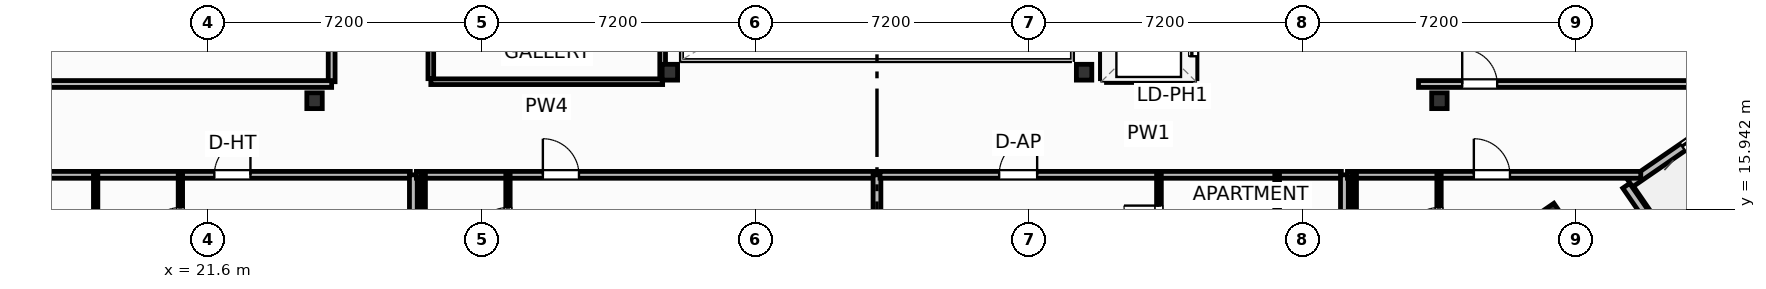
"""IFC4 building model, lengths in metres.
Left out: names, types, materials, properties, quantities, classifications, styles, units other than length and angle.
Written with IfcOpenShell. Run it as: python <this file> out.ifc"""

import sys

from ifc_helpers import new_model, si_unit, direction, frame, frame_2d, origin, origin_2d, place, context, subcontext, project, spatial, rectangle, i_section, extrude, element, fill, save


model = new_model("IFC4")
c1 = context("Model", 3, precision=1e-05, world=origin(), true_north=direction((0.0, 1.0)))
c2 = subcontext(c1, "Body", "Model", "MODEL_VIEW")
j1 = project(units=[si_unit("LENGTHUNIT", "METRE"), si_unit("PLANEANGLEUNIT", "RADIAN")], contexts=[c1])
p1 = place(None, origin())
s1 = spatial("IfcSite", under=j1, at=p1, CompositionType="ELEMENT")
p2 = place(p1, origin())
s2 = spatial("IfcBuilding", under=s1, at=p2, CompositionType="ELEMENT")
p3 = place(p2, frame((0.0, 0.0, 269.3)))
s3 = spatial("IfcBuildingStorey", under=s2, at=p3, CompositionType="ELEMENT", Elevation=269.3)
for number, where, z_axis, x_axis in (
    (1, (33.75, 19.55, 0.0), (0.0, 0.0, 1.0), (1.0, 0.0, 0.0)),
    (2, (44.65, 19.55, 0.0), (0.0, 0.0, 1.0), (1.0, 0.0, 0.0)),
    (3, (24.4, 18.8, 0.0), (0.0, 0.0, 1.0), (1.0, 0.0, 0.0)),
    (4, (54.0, 18.8, 0.0), (0.0, 0.0, 1.0), (1.0, 0.0, 0.0)),
):
    element("IfcColumn", number, at=place(p3, frame(where, z_axis=z_axis, x_axis=x_axis)), inside=s3, PredefinedType="COLUMN", context=c2, shape_type="SweptSolid", body=[
        extrude(i_section(OverallWidth=0.406, OverallDepth=0.416, WebThickness=0.03, FlangeThickness=0.048, FilletRadius=0.025, at=origin_2d()), origin(), (0.0, 0.0, 1.0), 3.7),
    ])
p4 = place(p3, frame((56.96, 15.823, 0.0), z_axis=(0.0, 0.0, 1.0), x_axis=(0.823532597628, 0.567268949127, 0.0)))
e5 = element("IfcColumn", 5, at=p4, inside=s3, PredefinedType="COLUMN", context=c2, shape_type="SweptSolid", body=[
    extrude(i_section(OverallWidth=0.401, OverallDepth=0.399, WebThickness=0.025, FlangeThickness=0.04, FilletRadius=0.022, at=origin_2d()), origin(), (0.0, 0.0, 1.0), 3.7),
])
p5 = place(p3, frame((63.605, 19.78, 0.0), z_axis=(0.0, 0.0, 1.0), x_axis=(-0.823541290762, -0.567256328665, 0.0)))
e6 = element("IfcWall", 6, at=p5, inside=s3, PredefinedType="SOLIDWALL", context=c2, shape_type="SweptSolid", body=[
    extrude(rectangle(XDim=5.567, YDim=0.22, at=frame_2d((2.784, 0.0))), origin(), (0.0, 0.0, 1.0), 2.73),
])
p6 = place(p5, frame((1.787, 0.0, 0.0)))
e7 = element("IfcOpeningElement", 7, at=p6, cuts=e6, PredefinedType="OPENING", context=c2, shape_type="SweptSolid", body=[
    extrude(rectangle(XDim=2.1, YDim=2.3, at=frame_2d((1.05, 1.15))), frame((0.0, 0.12, 0.0), z_axis=(0.0, -1.0, 0.0), x_axis=(1.0, 0.0, 0.0)), (0.0, 0.0, 1.0), 0.24),
])
p7 = place(p3, frame((60.036, 14.936, 0.0), z_axis=(0.0, 0.0, 1.0), x_axis=(-0.567273565974, 0.823529417415, 0.0)))
e8 = element("IfcWall", 8, at=p7, inside=s3, PredefinedType="SOLIDWALL", context=c2, shape_type="SweptSolid", body=[
    extrude(rectangle(XDim=1.975, YDim=0.22, at=frame_2d((0.988, 0.0))), origin(), (0.0, 0.0, 1.0), 2.73),
])
p8 = place(p3, frame((5.038, 16.85, 0.0), z_axis=(0.0, 0.0, 1.0), x_axis=(1.0, 0.0, 0.0)))
e9 = element("IfcWall", 9, at=p8, inside=s3, PredefinedType="PARTITIONING", context=c2, shape_type="SweptSolid", body=[
    extrude(rectangle(XDim=21.882, YDim=0.18, at=frame_2d((10.941, 0.0))), origin(), (0.0, 0.0, 1.0), 2.739),
])
p9 = place(p8, frame((16.725, 0.0, 0.0)))
e10 = element("IfcOpeningElement", 10, at=p9, cuts=e9, PredefinedType="OPENING", context=c2, shape_type="SweptSolid", body=[
    extrude(rectangle(XDim=0.95, YDim=2.15, at=frame_2d((0.475, 1.075))), frame((0.0, 0.1, 0.0), z_axis=(0.0, -1.0, 0.0), x_axis=(1.0, 0.0, 0.0)), (0.0, 0.0, 1.0), 0.2),
])
p10 = place(p3, frame((20.87, 14.33, 0.0), z_axis=(0.0, 0.0, 1.0), x_axis=(0.0, 1.0, 0.0)))
e11 = element("IfcWall", 11, at=p10, inside=s3, PredefinedType="PARTITIONING", context=c2, shape_type="SweptSolid", body=[
    extrude(rectangle(XDim=2.52, YDim=0.115, at=frame_2d((1.26, 0.0))), origin(), (0.0, 0.0, 1.0), 3.45),
])
p11 = place(p10, frame((0.76, 0.0, 0.0)))
e12 = element("IfcOpeningElement", 12, at=p11, cuts=e11, PredefinedType="OPENING", context=c2, shape_type="SweptSolid", body=[
    extrude(rectangle(XDim=0.9, YDim=2.05, at=frame_2d((0.45, 1.025))), frame((0.0, 0.067, 0.0), z_axis=(0.0, -1.0, 0.0), x_axis=(1.0, 0.0, 0.0)), (0.0, 0.0, 1.0), 0.135),
])
p12 = place(p3, frame((18.64, 14.33, 0.0), z_axis=(0.0, 0.0, 1.0), x_axis=(0.0, 1.0, 0.0)))
e13 = element("IfcWall", 13, at=p12, inside=s3, PredefinedType="PARTITIONING", context=c2, shape_type="SweptSolid", body=[
    extrude(rectangle(XDim=2.52, YDim=0.115, at=frame_2d((1.26, 0.0))), origin(), (0.0, 0.0, 1.0), 3.45),
])
p13 = place(p3, frame((27.0, -4.0, 0.0), z_axis=(0.0, 0.0, 1.0), x_axis=(0.0, 1.0, 0.0)))
e14 = element("IfcWall", 14, at=p13, inside=s3, PredefinedType="PARTITIONING", context=c2, shape_type="SweptSolid", body=[
    extrude(rectangle(XDim=20.85, YDim=0.205, at=frame_2d((10.425, 0.0))), origin(), (0.0, 0.0, 1.0), 3.45),
])
p14 = place(p3, frame((27.08, 16.85, 0.0), z_axis=(0.0, 0.0, 1.0), x_axis=(1.0, 0.0, 0.0)))
e15 = element("IfcWall", 15, at=p14, inside=s3, PredefinedType="PARTITIONING", context=c2, shape_type="SweptSolid", body=[
    extrude(rectangle(XDim=12.04, YDim=0.18, at=frame_2d((6.02, 0.0))), origin(), (0.0, 0.0, 1.0), 3.45),
])
p15 = place(p14, frame((3.328, 0.0, 0.0)))
e16 = element("IfcOpeningElement", 16, at=p15, cuts=e15, PredefinedType="OPENING", context=c2, shape_type="SweptSolid", body=[
    extrude(rectangle(XDim=0.95, YDim=2.15, at=frame_2d((0.475, 1.075))), frame((0.0, 0.1, 0.0), z_axis=(0.0, -1.0, 0.0), x_axis=(1.0, 0.0, 0.0)), (0.0, 0.0, 1.0), 0.2),
])
p16 = place(p3, frame((29.49, 14.33, 0.0), z_axis=(0.0, 0.0, 1.0), x_axis=(0.0, 1.0, 0.0)))
e17 = element("IfcWall", 17, at=p16, inside=s3, PredefinedType="PARTITIONING", context=c2, shape_type="SweptSolid", body=[
    extrude(rectangle(XDim=2.52, YDim=0.115, at=frame_2d((1.26, 0.0))), origin(), (0.0, 0.0, 1.0), 3.45),
])
p17 = place(p16, frame((0.76, 0.0, 0.0)))
e18 = element("IfcOpeningElement", 18, at=p17, cuts=e17, PredefinedType="OPENING", context=c2, shape_type="SweptSolid", body=[
    extrude(rectangle(XDim=0.9, YDim=2.05, at=frame_2d((0.45, 1.025))), frame((0.0, 0.067, 0.0), z_axis=(0.0, -1.0, 0.0), x_axis=(1.0, 0.0, 0.0)), (0.0, 0.0, 1.0), 0.135),
])
p18 = place(p3, frame((27.26, 14.33, 0.0), z_axis=(0.0, 0.0, 1.0), x_axis=(0.0, 1.0, 0.0)))
e19 = element("IfcWall", 19, at=p18, inside=s3, PredefinedType="PARTITIONING", context=c2, shape_type="SweptSolid", body=[
    extrude(rectangle(XDim=2.52, YDim=0.115, at=frame_2d((1.26, 0.0))), origin(), (0.0, 0.0, 1.0), 3.45),
])
p19 = place(p3, frame((39.2, 3.006, 0.0), z_axis=(0.0, 0.0, 1.0), x_axis=(0.0, 1.0, 0.0)))
e20 = element("IfcWall", 20, at=p19, inside=s3, PredefinedType="PARTITIONING", context=c2, shape_type="SweptSolid", body=[
    extrude(rectangle(XDim=13.844, YDim=0.205, at=frame_2d((6.922, 0.0))), origin(), (0.0, 0.0, 1.0), 3.45),
])
p20 = place(p3, frame((39.28, 16.85, 0.0), z_axis=(0.0, 0.0, 1.0), x_axis=(1.0, 0.0, 0.0)))
e21 = element("IfcWall", 21, at=p20, inside=s3, PredefinedType="PARTITIONING", context=c2, shape_type="SweptSolid", body=[
    extrude(rectangle(XDim=12.14, YDim=0.18, at=frame_2d((6.07, 0.0))), origin(), (0.0, 0.0, 1.0), 3.45),
])
p21 = place(p20, frame((3.135, 0.0, 0.0)))
e22 = element("IfcOpeningElement", 22, at=p21, cuts=e21, PredefinedType="OPENING", context=c2, shape_type="SweptSolid", body=[
    extrude(rectangle(XDim=1.0, YDim=2.2, at=frame_2d((0.5, 1.1))), frame((0.0, 0.1, 0.0), z_axis=(0.0, -1.0, 0.0), x_axis=(1.0, 0.0, 0.0)), (0.0, 0.0, 1.0), 0.2),
])
p22 = place(p3, frame((46.62, 5.567, 0.0), z_axis=(0.0, 0.0, 1.0), x_axis=(0.0, 1.0, 0.0)))
e23 = element("IfcWall", 23, at=p22, inside=s3, PredefinedType="PARTITIONING", context=c2, shape_type="SweptSolid", body=[
    extrude(rectangle(XDim=11.283, YDim=0.125, at=frame_2d((5.642, 0.0))), origin(), (0.0, 0.0, 1.0), 3.45),
])
p23 = place(p22, frame((4.757, 0.0, 0.0)))
e24 = element("IfcOpeningElement", 24, at=p23, cuts=e23, PredefinedType="OPENING", context=c2, shape_type="SweptSolid", body=[
    extrude(rectangle(XDim=0.92, YDim=2.05, at=frame_2d((0.46, 1.025))), frame((0.0, 0.073, 0.0), z_axis=(0.0, -1.0, 0.0), x_axis=(1.0, 0.0, 0.0)), (0.0, 0.0, 1.0), 0.145),
])
p24 = place(p22, frame((7.26, 0.0, 0.0)))
e25 = element("IfcOpeningElement", 25, at=p24, cuts=e23, PredefinedType="OPENING", context=c2, shape_type="SweptSolid", body=[
    extrude(rectangle(XDim=0.9, YDim=2.05, at=frame_2d((0.45, 1.025))), frame((0.0, 0.073, 0.0), z_axis=(0.0, -1.0, 0.0), x_axis=(1.0, 0.0, 0.0)), (0.0, 0.0, 1.0), 0.145),
])
p25 = place(p22, frame((9.553, 0.0, 0.0)))
e26 = element("IfcOpeningElement", 26, at=p25, cuts=e23, PredefinedType="OPENING", context=c2, shape_type="SweptSolid", body=[
    extrude(rectangle(XDim=0.92, YDim=2.05, at=frame_2d((0.46, 1.025))), frame((0.0, 0.073, 0.0), z_axis=(0.0, -1.0, 0.0), x_axis=(1.0, 0.0, 0.0)), (0.0, 0.0, 1.0), 0.145),
])
p26 = place(p3, frame((49.73, 14.44, 0.0), z_axis=(0.0, 0.0, 1.0), x_axis=(0.0, 1.0, 0.0)))
e27 = element("IfcWall", 27, at=p26, inside=s3, PredefinedType="PARTITIONING", context=c2, shape_type="SweptSolid", body=[
    extrude(rectangle(XDim=2.41, YDim=0.125, at=frame_2d((1.205, 0.0))), origin(), (0.0, 0.0, 1.0), 3.45),
])
p27 = place(p3, frame((51.5, 11.479, 0.0), z_axis=(0.0, 0.0, 1.0), x_axis=(0.0, 1.0, 0.0)))
e28 = element("IfcWall", 28, at=p27, inside=s3, PredefinedType="PARTITIONING", context=c2, shape_type="SweptSolid", body=[
    extrude(rectangle(XDim=5.372, YDim=0.205, at=frame_2d((2.686, 0.0))), origin(), (0.0, 0.0, 1.0), 3.45),
])
p28 = place(p3, frame((51.58, 16.85, 0.0), z_axis=(0.0, 0.0, 1.0), x_axis=(1.0, 0.0, 0.0)))
e29 = element("IfcWall", 29, at=p28, inside=s3, PredefinedType="PARTITIONING", context=c2, shape_type="SweptSolid", body=[
    extrude(rectangle(XDim=7.718, YDim=0.18, at=frame_2d((3.859, 0.0))), origin(), (0.0, 0.0, 1.0), 3.45),
])
p29 = place(p28, frame((3.326, 0.0, 0.0)))
e30 = element("IfcOpeningElement", 30, at=p29, cuts=e29, PredefinedType="OPENING", context=c2, shape_type="SweptSolid", body=[
    extrude(rectangle(XDim=0.95, YDim=2.15, at=frame_2d((0.475, 1.075))), frame((0.0, 0.1, 0.0), z_axis=(0.0, -1.0, 0.0), x_axis=(1.0, 0.0, 0.0)), (0.0, 0.0, 1.0), 0.2),
])
p30 = place(p3, frame((53.99, 14.33, 0.0), z_axis=(0.0, 0.0, 1.0), x_axis=(0.0, 1.0, 0.0)))
e31 = element("IfcWall", 31, at=p30, inside=s3, PredefinedType="PARTITIONING", context=c2, shape_type="SweptSolid", body=[
    extrude(rectangle(XDim=2.52, YDim=0.115, at=frame_2d((1.26, 0.0))), origin(), (0.0, 0.0, 1.0), 3.45),
])
p31 = place(p30, frame((0.76, 0.0, 0.0)))
e32 = element("IfcOpeningElement", 32, at=p31, cuts=e31, PredefinedType="OPENING", context=c2, shape_type="SweptSolid", body=[
    extrude(rectangle(XDim=0.9, YDim=2.05, at=frame_2d((0.45, 1.025))), frame((0.0, 0.067, 0.0), z_axis=(0.0, -1.0, 0.0), x_axis=(1.0, 0.0, 0.0)), (0.0, 0.0, 1.0), 0.135),
])
p32 = place(p3, frame((51.76, 14.33, 0.0), z_axis=(0.0, 0.0, 1.0), x_axis=(0.0, 1.0, 0.0)))
e33 = element("IfcWall", 33, at=p32, inside=s3, PredefinedType="PARTITIONING", context=c2, shape_type="SweptSolid", body=[
    extrude(rectangle(XDim=2.52, YDim=0.115, at=frame_2d((1.26, 0.0))), origin(), (0.0, 0.0, 1.0), 3.45),
])
p33 = place(p3, frame((24.85, 19.3, 0.0), z_axis=(0.0, 0.0, 1.0), x_axis=(0.0, 1.0, 0.0)))
e34 = element("IfcWall", 34, at=p33, inside=s3, PredefinedType="PARTITIONING", context=c2, shape_type="SweptSolid", body=[
    extrude(rectangle(XDim=3.57, YDim=0.18, at=frame_2d((1.785, 0.0))), origin(), (0.0, 0.0, 1.0), 3.45),
])
p34 = place(p33, frame((1.5, 0.0, 0.0)))
e35 = element("IfcOpeningElement", 35, at=p34, cuts=e34, PredefinedType="OPENING", context=c2, shape_type="SweptSolid", body=[
    extrude(rectangle(XDim=0.92, YDim=2.05, at=frame_2d((0.46, 1.025))), frame((0.0, 0.1, 0.0), z_axis=(0.0, -1.0, 0.0), x_axis=(1.0, 0.0, 0.0)), (0.0, 0.0, 1.0), 0.2),
])
p35 = place(p3, frame((3.392, 19.24, 0.0), z_axis=(0.0, 0.0, 1.0), x_axis=(1.0, 0.0, 0.0)))
e36 = element("IfcWall", 36, at=p35, inside=s3, PredefinedType="PARTITIONING", context=c2, shape_type="SweptSolid", body=[
    extrude(rectangle(XDim=21.458, YDim=0.18, at=frame_2d((10.729, 0.0))), origin(), (0.0, 0.0, 1.0), 3.45),
])
p36 = place(p3, frame((53.45, 19.24, 0.0), z_axis=(0.0, 0.0, 1.0), x_axis=(1.0, 0.0, 0.0)))
e37 = element("IfcWall", 37, at=p36, inside=s3, PredefinedType="PARTITIONING", context=c2, shape_type="SweptSolid", body=[
    extrude(rectangle(XDim=9.318, YDim=0.18, at=frame_2d((4.659, 0.0))), origin(), (0.0, 0.0, 1.0), 2.739),
])
p37 = place(p36, frame((1.15, 0.0, 0.0)))
e38 = element("IfcOpeningElement", 38, at=p37, cuts=e37, PredefinedType="OPENING", context=c2, shape_type="SweptSolid", body=[
    extrude(rectangle(XDim=0.92, YDim=2.05, at=frame_2d((0.46, 1.025))), frame((0.0, 0.1, 0.0), z_axis=(0.0, -1.0, 0.0), x_axis=(1.0, 0.0, 0.0)), (0.0, 0.0, 1.0), 0.2),
])
p38 = place(p3, frame((27.46, 19.3, 0.0), z_axis=(0.0, 0.0, 1.0), x_axis=(1.0, 0.0, 0.0)))
e39 = element("IfcWall", 39, at=p38, inside=s3, PredefinedType="PARTITIONING", context=c2, shape_type="SweptSolid", body=[
    extrude(rectangle(XDim=6.1, YDim=0.15, at=frame_2d((3.05, 0.0))), origin(), (0.0, 0.0, 1.0), 2.662),
])
p39 = place(p3, frame((27.46, 19.38, 0.0), z_axis=(0.0, 0.0, 1.0), x_axis=(0.0, 1.0, 0.0)))
e40 = element("IfcWall", 40, at=p39, inside=s3, PredefinedType="PARTITIONING", context=c2, shape_type="SweptSolid", body=[
    extrude(rectangle(XDim=7.16, YDim=0.15, at=frame_2d((3.58, 0.0))), origin(), (0.0, 0.0, 1.0), 3.45),
])
p40 = place(p39, frame((1.1, 0.0, 0.0)))
e41 = element("IfcOpeningElement", 41, at=p40, cuts=e40, PredefinedType="OPENING", context=c2, shape_type="SweptSolid", body=[
    extrude(rectangle(XDim=0.95, YDim=2.05, at=frame_2d((0.475, 1.025))), frame((0.0, 0.085, 0.0), z_axis=(0.0, -1.0, 0.0), x_axis=(1.0, 0.0, 0.0)), (0.0, 0.0, 1.0), 0.17),
])
p41 = place(p3, frame((33.56, 19.38, 0.0), z_axis=(0.0, 0.0, 1.0), x_axis=(0.0, 1.0, 0.0)))
e42 = element("IfcWall", 42, at=p41, inside=s3, PredefinedType="PARTITIONING", context=c2, shape_type="SweptSolid", body=[
    extrude(rectangle(XDim=7.16, YDim=0.15, at=frame_2d((3.58, 0.0))), origin(), (0.0, 0.0, 1.0), 2.824),
])
p42 = place(p3, frame((45.24, 19.38, 0.0), z_axis=(0.0, 0.0, 1.0), x_axis=(1.0, 0.0, 0.0)))
e43 = element("IfcWall", 43, at=p42, inside=s3, PredefinedType="PARTITIONING", context=c2, shape_type="SweptSolid", body=[
    extrude(rectangle(XDim=2.22, YDim=0.2, at=frame_2d((1.11, 0.0))), origin(), (0.0, 0.0, 1.0), 2.662),
])
p43 = place(p3, frame((45.18, 19.38, 0.0), z_axis=(0.0, 0.0, 1.0), x_axis=(0.0, 1.0, 0.0)))
e44 = element("IfcWall", 44, at=p43, inside=s3, PredefinedType="PARTITIONING", context=c2, shape_type="SweptSolid", body=[
    extrude(rectangle(XDim=6.9, YDim=0.2, at=frame_2d((3.45, 0.0))), origin(), (0.0, 0.0, 1.0), 3.45),
])
p44 = place(p3, frame((47.52, 19.38, 0.0), z_axis=(0.0, 0.0, 1.0), x_axis=(0.0, 1.0, 0.0)))
e45 = element("IfcWall", 45, at=p44, inside=s3, PredefinedType="PARTITIONING", context=c2, shape_type="SweptSolid", body=[
    extrude(rectangle(XDim=6.9, YDim=0.2, at=frame_2d((3.45, 0.0))), origin(), (0.0, 0.0, 1.0), 3.45),
])
p45 = place(p44, frame((0.59, 0.0, 0.0)))
e46 = element("IfcOpeningElement", 46, at=p45, cuts=e45, PredefinedType="OPENING", context=c2, shape_type="SweptSolid", body=[
    extrude(rectangle(XDim=1.1, YDim=2.15, at=frame_2d((0.55, 1.075))), frame((0.0, 0.11, 0.0), z_axis=(0.0, -1.0, 0.0), x_axis=(1.0, 0.0, 0.0)), (0.0, 0.0, 1.0), 0.22),
])
p46 = place(p44, frame((2.89, 0.0, 0.0)))
e47 = element("IfcOpeningElement", 47, at=p46, cuts=e45, PredefinedType="OPENING", context=c2, shape_type="SweptSolid", body=[
    extrude(rectangle(XDim=1.1, YDim=2.15, at=frame_2d((0.55, 1.075))), frame((0.0, 0.11, 0.0), z_axis=(0.0, -1.0, 0.0), x_axis=(1.0, 0.0, 0.0)), (0.0, 0.0, 1.0), 0.22),
])
p47 = place(p44, frame((5.19, 0.0, 0.0)))
e48 = element("IfcOpeningElement", 48, at=p47, cuts=e45, PredefinedType="OPENING", context=c2, shape_type="SweptSolid", body=[
    extrude(rectangle(XDim=1.1, YDim=2.15, at=frame_2d((0.55, 1.075))), frame((0.0, 0.11, 0.0), z_axis=(0.0, -1.0, 0.0), x_axis=(1.0, 0.0, 0.0)), (0.0, 0.0, 1.0), 0.22),
])
p48 = place(p6, origin())
e49 = element("IfcDoor", 49, at=p48, inside=s3, OperationType="SLIDING_TO_LEFT", PredefinedType="DOOR", context=c2, shape_type="SweptSolid", body=[
    extrude(rectangle(XDim=2.1, YDim=2.3, at=frame_2d((1.05, 1.15))), frame((0.0, 0.025, 0.0), z_axis=(0.0, -1.0, 0.0), x_axis=(1.0, 0.0, 0.0)), (0.0, 0.0, 1.0), 0.05),
])
fill(e7, e49)
p49 = place(p9, origin())
e50 = element("IfcDoor", 50, at=p49, inside=s3, OperationType="SINGLE_SWING_RIGHT", PredefinedType="DOOR", context=c2, shape_type="SweptSolid", body=[
    extrude(rectangle(XDim=0.95, YDim=2.15, at=frame_2d((0.475, 1.075))), frame((0.0, 0.025, 0.0), z_axis=(0.0, -1.0, 0.0), x_axis=(1.0, 0.0, 0.0)), (0.0, 0.0, 1.0), 0.05),
])
fill(e10, e50)
p50 = place(p11, origin())
e51 = element("IfcDoor", 51, at=p50, inside=s3, OperationType="SINGLE_SWING_LEFT", PredefinedType="DOOR", context=c2, shape_type="SweptSolid", body=[
    extrude(rectangle(XDim=0.9, YDim=2.05, at=frame_2d((0.45, 1.025))), frame((0.0, 0.025, 0.0), z_axis=(0.0, -1.0, 0.0), x_axis=(1.0, 0.0, 0.0)), (0.0, 0.0, 1.0), 0.05),
])
fill(e12, e51)
p51 = place(p15, origin())
e52 = element("IfcDoor", 52, at=p51, inside=s3, OperationType="SINGLE_SWING_LEFT", PredefinedType="DOOR", context=c2, shape_type="SweptSolid", body=[
    extrude(rectangle(XDim=0.95, YDim=2.15, at=frame_2d((0.475, 1.075))), frame((0.0, 0.025, 0.0), z_axis=(0.0, -1.0, 0.0), x_axis=(1.0, 0.0, 0.0)), (0.0, 0.0, 1.0), 0.05),
])
fill(e16, e52)
p52 = place(p17, origin())
e53 = element("IfcDoor", 53, at=p52, inside=s3, OperationType="SINGLE_SWING_LEFT", PredefinedType="DOOR", context=c2, shape_type="SweptSolid", body=[
    extrude(rectangle(XDim=0.9, YDim=2.05, at=frame_2d((0.45, 1.025))), frame((0.0, 0.025, 0.0), z_axis=(0.0, -1.0, 0.0), x_axis=(1.0, 0.0, 0.0)), (0.0, 0.0, 1.0), 0.05),
])
fill(e18, e53)
p53 = place(p21, origin())
e54 = element("IfcDoor", 54, at=p53, inside=s3, OperationType="SINGLE_SWING_RIGHT", PredefinedType="DOOR", context=c2, shape_type="SweptSolid", body=[
    extrude(rectangle(XDim=1.0, YDim=2.2, at=frame_2d((0.5, 1.1))), frame((0.0, 0.025, 0.0), z_axis=(0.0, -1.0, 0.0), x_axis=(1.0, 0.0, 0.0)), (0.0, 0.0, 1.0), 0.05),
])
fill(e22, e54)
p54 = place(p25, origin())
e55 = element("IfcDoor", 55, at=p54, inside=s3, OperationType="SINGLE_SWING_RIGHT", PredefinedType="DOOR", context=c2, shape_type="SweptSolid", body=[
    extrude(rectangle(XDim=0.92, YDim=2.05, at=frame_2d((0.46, 1.025))), frame((0.0, 0.025, 0.0), z_axis=(0.0, -1.0, 0.0), x_axis=(1.0, 0.0, 0.0)), (0.0, 0.0, 1.0), 0.05),
])
fill(e26, e55)
p55 = place(p29, origin())
e56 = element("IfcDoor", 56, at=p55, inside=s3, OperationType="SINGLE_SWING_LEFT", PredefinedType="DOOR", context=c2, shape_type="SweptSolid", body=[
    extrude(rectangle(XDim=0.95, YDim=2.15, at=frame_2d((0.475, 1.075))), frame((0.0, 0.025, 0.0), z_axis=(0.0, -1.0, 0.0), x_axis=(1.0, 0.0, 0.0)), (0.0, 0.0, 1.0), 0.05),
])
fill(e30, e56)
p56 = place(p31, origin())
e57 = element("IfcDoor", 57, at=p56, inside=s3, OperationType="SINGLE_SWING_LEFT", PredefinedType="DOOR", context=c2, shape_type="SweptSolid", body=[
    extrude(rectangle(XDim=0.9, YDim=2.05, at=frame_2d((0.45, 1.025))), frame((0.0, 0.025, 0.0), z_axis=(0.0, -1.0, 0.0), x_axis=(1.0, 0.0, 0.0)), (0.0, 0.0, 1.0), 0.05),
])
fill(e32, e57)
p57 = place(p37, origin())
e58 = element("IfcDoor", 58, at=p57, inside=s3, OperationType="SINGLE_SWING_LEFT", PredefinedType="DOOR", context=c2, shape_type="SweptSolid", body=[
    extrude(rectangle(XDim=0.92, YDim=2.05, at=frame_2d((0.46, 1.025))), frame((0.0, 0.025, 0.0), z_axis=(0.0, -1.0, 0.0), x_axis=(1.0, 0.0, 0.0)), (0.0, 0.0, 1.0), 0.05),
])
fill(e38, e58)
p58 = place(p45, origin())
e59 = element("IfcDoor", 59, at=p58, inside=s3, OperationType="SLIDING_TO_LEFT", PredefinedType="DOOR", context=c2, shape_type="SweptSolid", body=[
    extrude(rectangle(XDim=1.1, YDim=2.15, at=frame_2d((0.55, 1.075))), frame((0.0, 0.025, 0.0), z_axis=(0.0, -1.0, 0.0), x_axis=(1.0, 0.0, 0.0)), (0.0, 0.0, 1.0), 0.05),
])
fill(e46, e59)
save(model, sys.argv[1])
